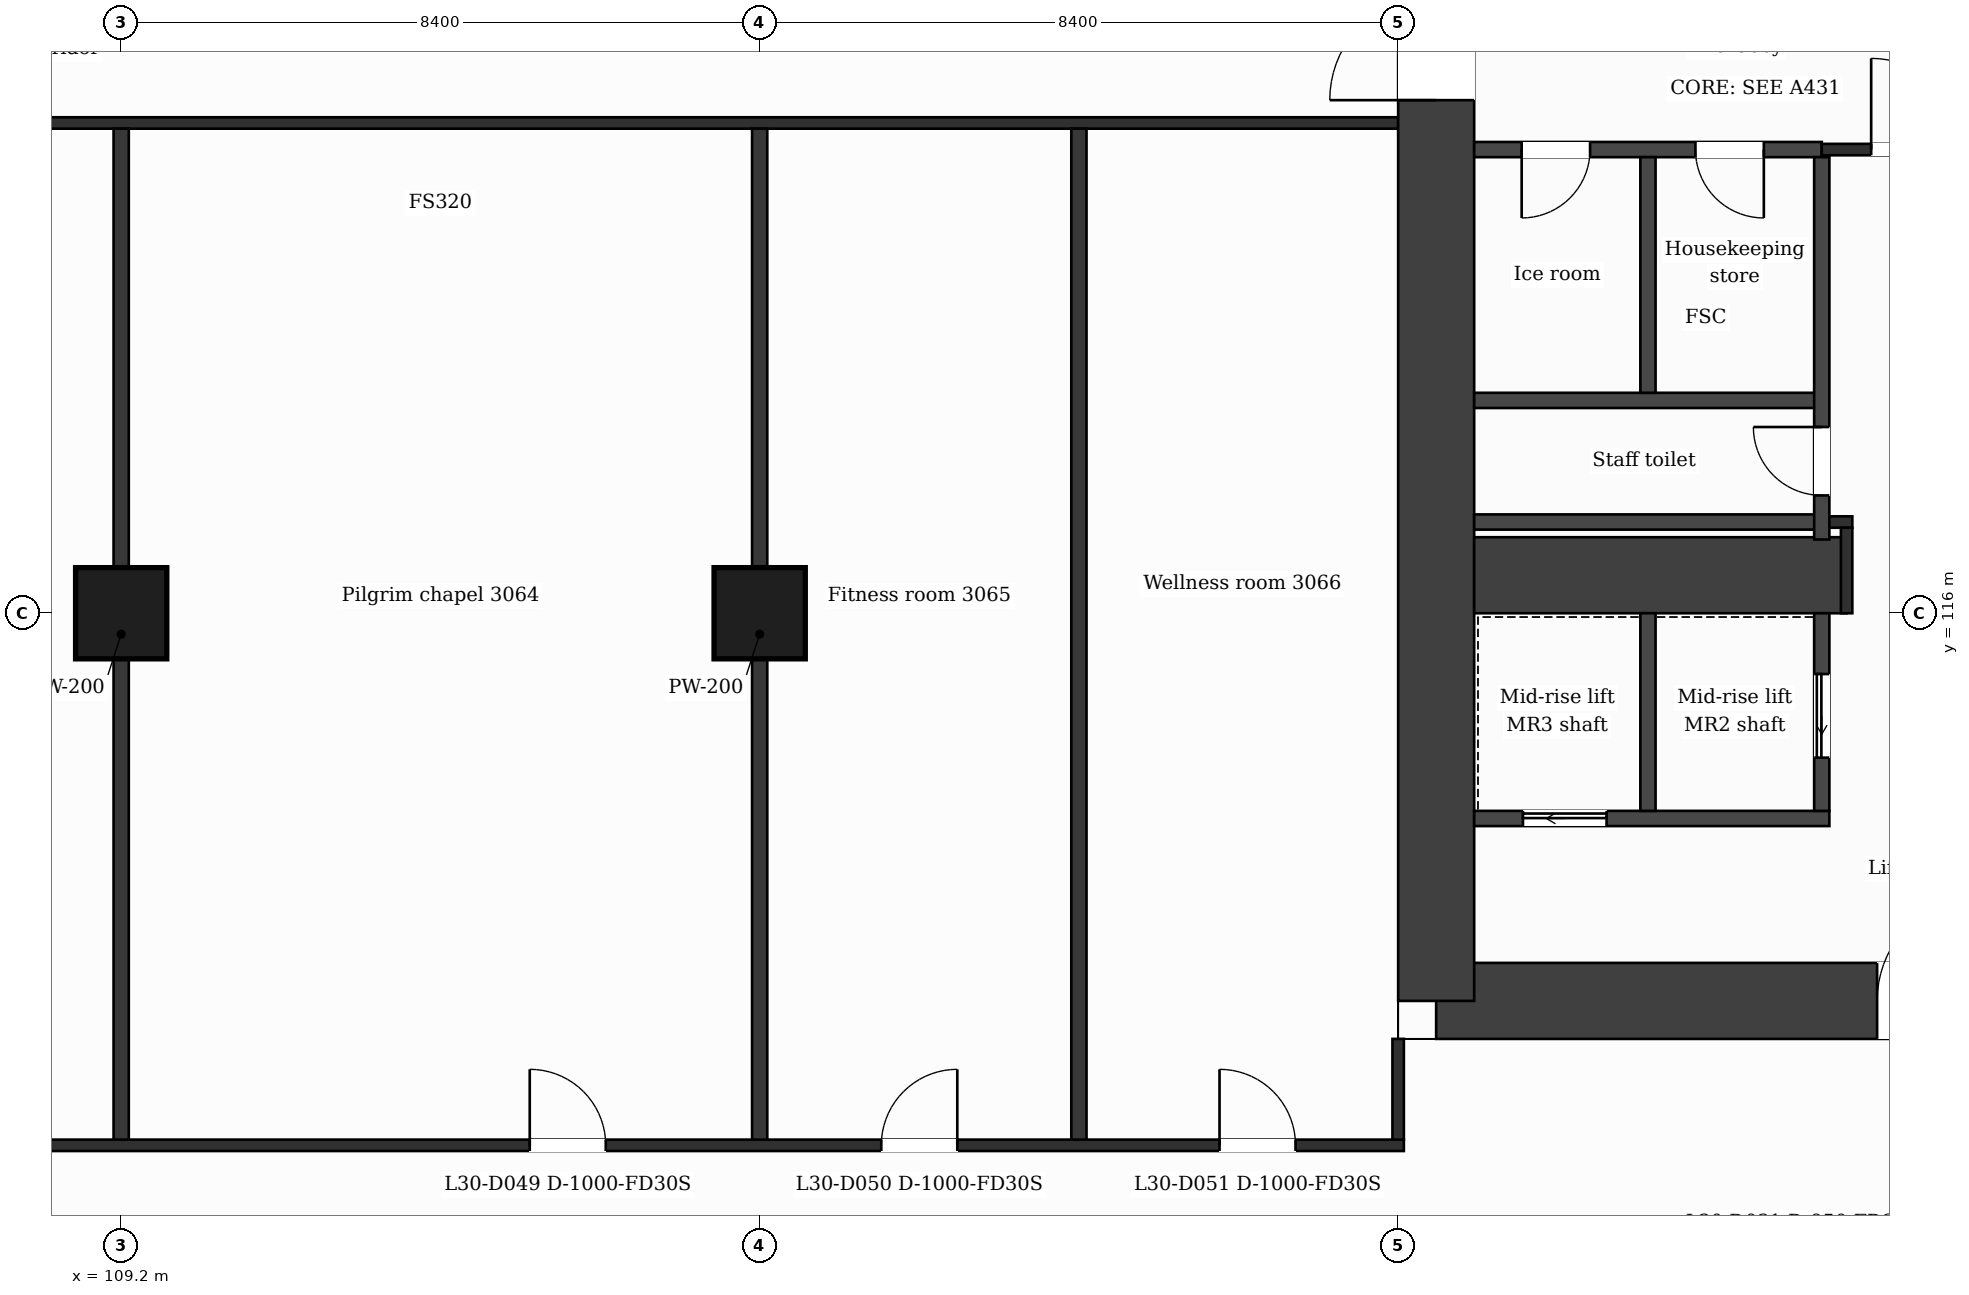
"""IFC4 building model, lengths in metres.
Left out: names, types, materials, properties, quantities, classifications, styles, units other than length and angle.
Written with IfcOpenShell. Run it as: python <this file> out.ifc"""

import sys

from ifc_helpers import new_model, si_unit, direction, frame, frame_2d, origin, origin_2d, place, context, subcontext, project, spatial, rectangle, extrude, element, fill, save


model = new_model("IFC4")
c1 = context("Model", 3, precision=1e-05, world=origin(), true_north=direction((0.0, 1.0)))
c2 = subcontext(c1, "Body", "Model", "MODEL_VIEW")
j1 = project(units=[si_unit("LENGTHUNIT", "METRE"), si_unit("PLANEANGLEUNIT", "RADIAN")], contexts=[c1])
p1 = place(None, origin())
s1 = spatial("IfcSite", under=j1, at=p1, CompositionType="ELEMENT")
p2 = place(p1, origin())
s2 = spatial("IfcBuilding", under=s1, at=p2, CompositionType="ELEMENT")
p3 = place(p2, frame((0.0, 0.0, 128.0)))
s3 = spatial("IfcBuildingStorey", under=s2, at=p3, CompositionType="ELEMENT", Elevation=128.0)
p4 = place(p3, frame((140.559, 110.9, 0.0), z_axis=(0.0, 0.0, 1.0), x_axis=(-1.0, 0.0, 0.0)))
e1 = element("IfcWall", 1, at=p4, inside=s3, PredefinedType="SHEAR", context=c2, shape_type="SweptSolid", body=[
    extrude(rectangle(XDim=14.059, YDim=1.0, at=frame_2d((7.029, 0.0))), origin(), (0.0, 0.0, 1.0), 3.7),
])
p5 = place(p4, frame((6.858, 0.0, 0.0)))
e2 = element("IfcOpeningElement", 2, at=p5, cuts=e1, PredefinedType="OPENING", context=c2, shape_type="SweptSolid", body=[
    extrude(rectangle(XDim=1.4, YDim=2.1, at=frame_2d((0.7, 1.05))), frame((0.0, 0.51, 0.0), z_axis=(0.0, -1.0, 0.0), x_axis=(1.0, 0.0, 0.0)), (0.0, 0.0, 1.0), 1.02),
])
p6 = place(p3, frame((126.5, 110.9, 0.0), z_axis=(0.0, 0.0, 1.0), x_axis=(0.0, 1.0, 0.0)))
e3 = element("IfcWall", 3, at=p6, inside=s3, PredefinedType="SHEAR", context=c2, shape_type="SweptSolid", body=[
    extrude(rectangle(XDim=21.0, YDim=1.0, at=frame_2d((10.5, 0.0))), origin(), (0.0, 0.0, 1.0), 3.7),
])
p7 = place(p6, frame((11.85, 0.0, 0.0)))
e4 = element("IfcOpeningElement", 4, at=p7, cuts=e3, PredefinedType="OPENING", context=c2, shape_type="SweptSolid", body=[
    extrude(rectangle(XDim=1.4, YDim=2.1, at=frame_2d((0.7, 1.05))), frame((0.0, 0.51, 0.0), z_axis=(0.0, -1.0, 0.0), x_axis=(1.0, 0.0, 0.0)), (0.0, 0.0, 1.0), 1.02),
])
p8 = place(p3, frame((127.0, 116.5, 0.0), z_axis=(0.0, 0.0, 1.0), x_axis=(1.0, 0.0, 0.0)))
e5 = element("IfcWall", 5, at=p8, inside=s3, PredefinedType="SHEAR", context=c2, shape_type="SweptSolid", body=[
    extrude(rectangle(XDim=4.9, YDim=1.0, at=frame_2d((2.45, 0.0))), origin(), (0.0, 0.0, 1.0), 3.7),
])
for number, where, z_axis, x_axis in (
    (6, (109.2, 116.0, 0.0), (0.0, 0.0, 1.0), (1.0, 0.0, 0.0)),
    (7, (117.6, 116.0, 0.0), (0.0, 0.0, 1.0), (1.0, 0.0, 0.0)),
):
    element("IfcColumn", number, at=place(p3, frame(where, z_axis=z_axis, x_axis=x_axis)), inside=s3, PredefinedType="COLUMN", context=c2, shape_type="SweptSolid", body=[
        extrude(rectangle(XDim=1.2, YDim=1.2, at=origin_2d()), origin(), (0.0, 0.0, 1.0), 3.7),
    ])
p9 = place(p3, frame((100.725, 109.0, 0.0), z_axis=(0.0, 0.0, 1.0), x_axis=(1.0, 0.0, 0.0)))
e8 = element("IfcWall", 8, at=p9, inside=s3, PredefinedType="PARTITIONING", context=c2, shape_type="SweptSolid", body=[
    extrude(rectangle(XDim=25.35, YDim=0.15, at=frame_2d((12.675, 0.0))), origin(), (0.0, 0.0, 1.0), 3.38),
])
p10 = place(p9, frame((3.105, 0.0, 0.0)))
e9 = element("IfcOpeningElement", 9, at=p10, cuts=e8, PredefinedType="OPENING", context=c2, shape_type="SweptSolid", body=[
    extrude(rectangle(XDim=1.0, YDim=2.1, at=frame_2d((0.5, 1.05))), frame((0.0, 0.085, 0.0), z_axis=(0.0, -1.0, 0.0), x_axis=(1.0, 0.0, 0.0)), (0.0, 0.0, 1.0), 0.17),
])
p11 = place(p9, frame((13.85, 0.0, 0.0)))
e10 = element("IfcOpeningElement", 10, at=p11, cuts=e8, PredefinedType="OPENING", context=c2, shape_type="SweptSolid", body=[
    extrude(rectangle(XDim=1.0, YDim=2.1, at=frame_2d((0.5, 1.05))), frame((0.0, 0.085, 0.0), z_axis=(0.0, -1.0, 0.0), x_axis=(1.0, 0.0, 0.0)), (0.0, 0.0, 1.0), 0.17),
])
p12 = place(p9, frame((18.475, 0.0, 0.0)))
e11 = element("IfcOpeningElement", 11, at=p12, cuts=e8, PredefinedType="OPENING", context=c2, shape_type="SweptSolid", body=[
    extrude(rectangle(XDim=1.0, YDim=2.1, at=frame_2d((0.5, 1.05))), frame((0.0, 0.085, 0.0), z_axis=(0.0, -1.0, 0.0), x_axis=(1.0, 0.0, 0.0)), (0.0, 0.0, 1.0), 0.17),
])
p13 = place(p9, frame((22.925, 0.0, 0.0)))
e12 = element("IfcOpeningElement", 12, at=p13, cuts=e8, PredefinedType="OPENING", context=c2, shape_type="SweptSolid", body=[
    extrude(rectangle(XDim=1.0, YDim=2.1, at=frame_2d((0.5, 1.05))), frame((0.0, 0.085, 0.0), z_axis=(0.0, -1.0, 0.0), x_axis=(1.0, 0.0, 0.0)), (0.0, 0.0, 1.0), 0.17),
])
p14 = place(p3, frame((127.0, 113.3, 0.0), z_axis=(0.0, 0.0, 1.0), x_axis=(1.0, 0.0, 0.0)))
e13 = element("IfcWall", 13, at=p14, inside=s3, PredefinedType="PARTITIONING", context=c2, shape_type="SweptSolid", body=[
    extrude(rectangle(XDim=4.673, YDim=0.2, at=frame_2d((2.336, 0.0))), origin(), (0.0, 0.0, 1.0), 3.38),
])
p15 = place(p14, frame((0.642, 0.0, 0.0)))
e14 = element("IfcOpeningElement", 14, at=p15, cuts=e13, PredefinedType="OPENING", context=c2, shape_type="SweptSolid", body=[
    extrude(rectangle(XDim=1.1, YDim=2.1, at=frame_2d((0.55, 1.05))), frame((0.0, 0.11, 0.0), z_axis=(0.0, -1.0, 0.0), x_axis=(1.0, 0.0, 0.0)), (0.0, 0.0, 1.0), 0.22),
])
p16 = place(p3, frame((127.0, 117.2, 0.0), z_axis=(0.0, 0.0, 1.0), x_axis=(1.0, 0.0, 0.0)))
e15 = element("IfcWall", 15, at=p16, inside=s3, PredefinedType="PARTITIONING", context=c2, shape_type="SweptSolid", body=[
    extrude(rectangle(XDim=4.573, YDim=0.2, at=frame_2d((2.287, 0.0))), origin(), (0.0, 0.0, 1.0), 3.38),
])
p17 = place(p3, frame((131.573, 117.2, 0.0), z_axis=(0.0, 0.0, 1.0), x_axis=(1.0, 0.0, 0.0)))
e16 = element("IfcWall", 16, at=p17, inside=s3, PredefinedType="PARTITIONING", context=c2, shape_type="SweptSolid", body=[
    extrude(rectangle(XDim=0.402, YDim=0.15, at=frame_2d((0.201, 0.0))), origin(), (0.0, 0.0, 1.0), 3.38),
])
p18 = place(p3, frame((127.0, 118.8, 0.0), z_axis=(0.0, 0.0, 1.0), x_axis=(1.0, 0.0, 0.0)))
e17 = element("IfcWall", 17, at=p18, inside=s3, PredefinedType="PARTITIONING", context=c2, shape_type="SweptSolid", body=[
    extrude(rectangle(XDim=4.573, YDim=0.2, at=frame_2d((2.287, 0.0))), origin(), (0.0, 0.0, 1.0), 3.38),
])
p19 = place(p3, frame((127.0, 122.1, 0.0), z_axis=(0.0, 0.0, 1.0), x_axis=(1.0, 0.0, 0.0)))
e18 = element("IfcWall", 18, at=p19, inside=s3, PredefinedType="PARTITIONING", context=c2, shape_type="SweptSolid", body=[
    extrude(rectangle(XDim=4.573, YDim=0.2, at=frame_2d((2.287, 0.0))), origin(), (0.0, 0.0, 1.0), 3.38),
])
p20 = place(p19, frame((2.911, 0.0, 0.0)))
e19 = element("IfcOpeningElement", 19, at=p20, cuts=e18, PredefinedType="OPENING", context=c2, shape_type="SweptSolid", body=[
    extrude(rectangle(XDim=0.9, YDim=2.1, at=frame_2d((0.45, 1.05))), frame((0.0, 0.11, 0.0), z_axis=(0.0, -1.0, 0.0), x_axis=(1.0, 0.0, 0.0)), (0.0, 0.0, 1.0), 0.22),
])
p21 = place(p19, frame((0.625, 0.0, 0.0)))
e20 = element("IfcOpeningElement", 20, at=p21, cuts=e18, PredefinedType="OPENING", context=c2, shape_type="SweptSolid", body=[
    extrude(rectangle(XDim=0.9, YDim=2.1, at=frame_2d((0.45, 1.05))), frame((0.0, 0.11, 0.0), z_axis=(0.0, -1.0, 0.0), x_axis=(1.0, 0.0, 0.0)), (0.0, 0.0, 1.0), 0.22),
])
p22 = place(p3, frame((131.573, 122.1, 0.0), z_axis=(0.0, 0.0, 1.0), x_axis=(1.0, 0.0, 0.0)))
e21 = element("IfcWall", 21, at=p22, inside=s3, PredefinedType="PARTITIONING", context=c2, shape_type="SweptSolid", body=[
    extrude(rectangle(XDim=2.4, YDim=0.15, at=frame_2d((1.2, 0.0))), origin(), (0.0, 0.0, 1.0), 3.38),
])
p23 = place(p22, frame((0.65, 0.0, 0.0)))
e22 = element("IfcOpeningElement", 22, at=p23, cuts=e21, PredefinedType="OPENING", context=c2, shape_type="SweptSolid", body=[
    extrude(rectangle(XDim=1.2, YDim=2.1, at=frame_2d((0.6, 1.05))), frame((0.0, 0.085, 0.0), z_axis=(0.0, -1.0, 0.0), x_axis=(1.0, 0.0, 0.0)), (0.0, 0.0, 1.0), 0.17),
])
p24 = place(p3, frame((100.8, 122.45, 0.0), z_axis=(0.0, 0.0, 1.0), x_axis=(1.0, 0.0, 0.0)))
e23 = element("IfcWall", 23, at=p24, inside=s3, PredefinedType="PARTITIONING", context=c2, shape_type="SweptSolid", body=[
    extrude(rectangle(XDim=25.2, YDim=0.15, at=frame_2d((12.6, 0.0))), origin(), (0.0, 0.0, 1.0), 3.38),
])
for number, where, z_axis, x_axis in (
    (24, (109.2, 109.075, 0.0), (0.0, 0.0, 1.0), (0.0, 1.0, 0.0)),
    (25, (117.6, 109.075, 0.0), (0.0, 0.0, 1.0), (0.0, 1.0, 0.0)),
    (26, (121.8, 109.075, 0.0), (0.0, 0.0, 1.0), (0.0, 1.0, 0.0)),
):
    element("IfcWall", number, at=place(p3, frame(where, z_axis=z_axis, x_axis=x_axis)), inside=s3, PredefinedType="PARTITIONING", context=c2, shape_type="SweptSolid", body=[
        extrude(rectangle(XDim=13.3, YDim=0.2, at=frame_2d((6.65, 0.0))), origin(), (0.0, 0.0, 1.0), 3.38),
    ])
p25 = place(p3, frame((126.0, 109.075, 0.0), z_axis=(0.0, 0.0, 1.0), x_axis=(0.0, 1.0, 0.0)))
e27 = element("IfcWall", 27, at=p25, inside=s3, PredefinedType="PARTITIONING", context=c2, shape_type="SweptSolid", body=[
    extrude(rectangle(XDim=1.325, YDim=0.15, at=frame_2d((0.663, 0.0))), origin(), (0.0, 0.0, 1.0), 3.38),
])
p26 = place(p3, frame((129.287, 113.4, 0.0), z_axis=(0.0, 0.0, 1.0), x_axis=(0.0, 1.0, 0.0)))
e28 = element("IfcWall", 28, at=p26, inside=s3, PredefinedType="PARTITIONING", context=c2, shape_type="SweptSolid", body=[
    extrude(rectangle(XDim=2.6, YDim=0.2, at=frame_2d((1.3, 0.0))), origin(), (0.0, 0.0, 1.0), 3.38),
])
p27 = place(p3, frame((129.287, 118.9, 0.0), z_axis=(0.0, 0.0, 1.0), x_axis=(0.0, 1.0, 0.0)))
e29 = element("IfcWall", 29, at=p27, inside=s3, PredefinedType="PARTITIONING", context=c2, shape_type="SweptSolid", body=[
    extrude(rectangle(XDim=3.1, YDim=0.2, at=frame_2d((1.55, 0.0))), origin(), (0.0, 0.0, 1.0), 3.38),
])
p28 = place(p3, frame((131.573, 113.4, 0.0), z_axis=(0.0, 0.0, 1.0), x_axis=(0.0, 1.0, 0.0)))
e30 = element("IfcWall", 30, at=p28, inside=s3, PredefinedType="PARTITIONING", context=c2, shape_type="SweptSolid", body=[
    extrude(rectangle(XDim=2.6, YDim=0.2, at=frame_2d((1.3, 0.0))), origin(), (0.0, 0.0, 1.0), 3.38),
])
p29 = place(p28, frame((0.7, 0.0, 0.0)))
e31 = element("IfcOpeningElement", 31, at=p29, cuts=e30, PredefinedType="OPENING", context=c2, shape_type="SweptSolid", body=[
    extrude(rectangle(XDim=1.1, YDim=2.1, at=frame_2d((0.55, 1.05))), frame((0.0, 0.11, 0.0), z_axis=(0.0, -1.0, 0.0), x_axis=(1.0, 0.0, 0.0)), (0.0, 0.0, 1.0), 0.22),
])
p30 = place(p3, frame((131.573, 116.97, 0.0), z_axis=(0.0, 0.0, 1.0), x_axis=(0.0, 1.0, 0.0)))
e32 = element("IfcWall", 32, at=p30, inside=s3, PredefinedType="PARTITIONING", context=c2, shape_type="SweptSolid", body=[
    extrude(rectangle(XDim=5.03, YDim=0.2, at=frame_2d((2.515, 0.0))), origin(), (0.0, 0.0, 1.0), 3.38),
])
p31 = place(p30, frame((0.58, 0.0, 0.0)))
e33 = element("IfcOpeningElement", 33, at=p31, cuts=e32, PredefinedType="OPENING", context=c2, shape_type="SweptSolid", body=[
    extrude(rectangle(XDim=0.9, YDim=2.1, at=frame_2d((0.45, 1.05))), frame((0.0, 0.11, 0.0), z_axis=(0.0, -1.0, 0.0), x_axis=(1.0, 0.0, 0.0)), (0.0, 0.0, 1.0), 0.22),
])
p32 = place(p3, frame((131.9, 116.0, 0.0), z_axis=(0.0, 0.0, 1.0), x_axis=(0.0, 1.0, 0.0)))
e34 = element("IfcWall", 34, at=p32, inside=s3, PredefinedType="PARTITIONING", context=c2, shape_type="SweptSolid", body=[
    extrude(rectangle(XDim=1.125, YDim=0.15, at=frame_2d((0.562, 0.0))), origin(), (0.0, 0.0, 1.0), 3.38),
])
p33 = place(p23, origin())
e35 = element("IfcDoor", 35, at=p33, inside=s3, OperationType="SINGLE_SWING_LEFT", PredefinedType="DOOR", context=c2, shape_type="SweptSolid", body=[
    extrude(rectangle(XDim=1.2, YDim=2.1, at=frame_2d((0.6, 1.05))), frame((0.0, 0.025, 0.0), z_axis=(0.0, -1.0, 0.0), x_axis=(1.0, 0.0, 0.0)), (0.0, 0.0, 1.0), 0.05),
])
fill(e22, e35)
p34 = place(p20, origin())
e36 = element("IfcDoor", 36, at=p34, inside=s3, OperationType="SINGLE_SWING_RIGHT", PredefinedType="DOOR", context=c2, shape_type="SweptSolid", body=[
    extrude(rectangle(XDim=0.9, YDim=2.1, at=frame_2d((0.45, 1.05))), frame((0.0, 0.025, 0.0), z_axis=(0.0, -1.0, 0.0), x_axis=(1.0, 0.0, 0.0)), (0.0, 0.0, 1.0), 0.05),
])
fill(e19, e36)
p35 = place(p21, origin())
e37 = element("IfcDoor", 37, at=p35, inside=s3, OperationType="SINGLE_SWING_LEFT", PredefinedType="DOOR", context=c2, shape_type="SweptSolid", body=[
    extrude(rectangle(XDim=0.9, YDim=2.1, at=frame_2d((0.45, 1.05))), frame((0.0, 0.025, 0.0), z_axis=(0.0, -1.0, 0.0), x_axis=(1.0, 0.0, 0.0)), (0.0, 0.0, 1.0), 0.05),
])
fill(e20, e37)
p36 = place(p31, origin())
e38 = element("IfcDoor", 38, at=p36, inside=s3, OperationType="SINGLE_SWING_RIGHT", PredefinedType="DOOR", context=c2, shape_type="SweptSolid", body=[
    extrude(rectangle(XDim=0.9, YDim=2.1, at=frame_2d((0.45, 1.05))), frame((0.0, 0.025, 0.0), z_axis=(0.0, -1.0, 0.0), x_axis=(1.0, 0.0, 0.0)), (0.0, 0.0, 1.0), 0.05),
])
fill(e33, e38)
p37 = place(p29, origin())
e39 = element("IfcDoor", 39, at=p37, inside=s3, OperationType="SLIDING_TO_LEFT", PredefinedType="DOOR", context=c2, shape_type="SweptSolid", body=[
    extrude(rectangle(XDim=1.1, YDim=2.1, at=frame_2d((0.55, 1.05))), frame((0.0, 0.025, 0.0), z_axis=(0.0, -1.0, 0.0), x_axis=(1.0, 0.0, 0.0)), (0.0, 0.0, 1.0), 0.05),
])
fill(e31, e39)
p38 = place(p15, origin())
e40 = element("IfcDoor", 40, at=p38, inside=s3, OperationType="SLIDING_TO_LEFT", PredefinedType="DOOR", context=c2, shape_type="SweptSolid", body=[
    extrude(rectangle(XDim=1.1, YDim=2.1, at=frame_2d((0.55, 1.05))), frame((0.0, 0.025, 0.0), z_axis=(0.0, -1.0, 0.0), x_axis=(1.0, 0.0, 0.0)), (0.0, 0.0, 1.0), 0.05),
])
fill(e14, e40)
p39 = place(p11, origin())
e41 = element("IfcDoor", 41, at=p39, inside=s3, OperationType="SINGLE_SWING_LEFT", PredefinedType="DOOR", context=c2, shape_type="SweptSolid", body=[
    extrude(rectangle(XDim=1.0, YDim=2.1, at=frame_2d((0.5, 1.05))), frame((0.0, 0.025, 0.0), z_axis=(0.0, -1.0, 0.0), x_axis=(1.0, 0.0, 0.0)), (0.0, 0.0, 1.0), 0.05),
])
fill(e10, e41)
p40 = place(p12, origin())
e42 = element("IfcDoor", 42, at=p40, inside=s3, OperationType="SINGLE_SWING_RIGHT", PredefinedType="DOOR", context=c2, shape_type="SweptSolid", body=[
    extrude(rectangle(XDim=1.0, YDim=2.1, at=frame_2d((0.5, 1.05))), frame((0.0, 0.025, 0.0), z_axis=(0.0, -1.0, 0.0), x_axis=(1.0, 0.0, 0.0)), (0.0, 0.0, 1.0), 0.05),
])
fill(e11, e42)
p41 = place(p13, origin())
e43 = element("IfcDoor", 43, at=p41, inside=s3, OperationType="SINGLE_SWING_LEFT", PredefinedType="DOOR", context=c2, shape_type="SweptSolid", body=[
    extrude(rectangle(XDim=1.0, YDim=2.1, at=frame_2d((0.5, 1.05))), frame((0.0, 0.025, 0.0), z_axis=(0.0, -1.0, 0.0), x_axis=(1.0, 0.0, 0.0)), (0.0, 0.0, 1.0), 0.05),
])
fill(e12, e43)
p42 = place(p5, origin())
e44 = element("IfcDoor", 44, at=p42, inside=s3, OperationType="SINGLE_SWING_LEFT", PredefinedType="DOOR", context=c2, shape_type="SweptSolid", body=[
    extrude(rectangle(XDim=1.4, YDim=2.1, at=frame_2d((0.7, 1.05))), frame((0.0, 0.025, 0.0), z_axis=(0.0, -1.0, 0.0), x_axis=(1.0, 0.0, 0.0)), (0.0, 0.0, 1.0), 0.05),
])
fill(e2, e44)
p43 = place(p7, origin())
e45 = element("IfcDoor", 45, at=p43, inside=s3, OperationType="SINGLE_SWING_LEFT", PredefinedType="DOOR", context=c2, shape_type="SweptSolid", body=[
    extrude(rectangle(XDim=1.4, YDim=2.1, at=frame_2d((0.7, 1.05))), frame((0.0, 0.025, 0.0), z_axis=(0.0, -1.0, 0.0), x_axis=(1.0, 0.0, 0.0)), (0.0, 0.0, 1.0), 0.05),
])
fill(e4, e45)
save(model, sys.argv[1])
